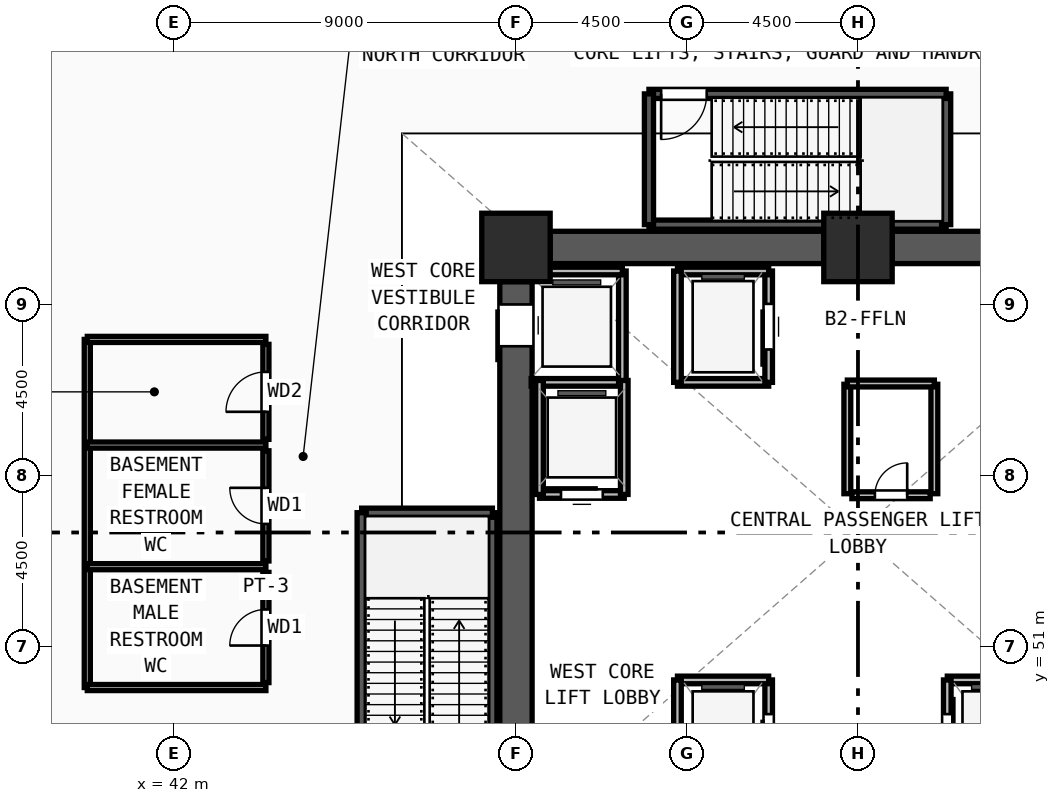
"""IFC4 building model, lengths in metres.
Left out: names, types, materials, properties, quantities, classifications, styles, units other than length and angle.
Written with IfcOpenShell. Run it as: python <this file> out.ifc"""

import sys

from ifc_helpers import new_model, si_unit, direction, frame, frame_2d, origin, origin_2d, place, context, subcontext, project, spatial, rectangle, extrude, source, transform, mapped, element, fill, save


model = new_model("IFC4")
c1 = context("Model", 3, precision=1e-05, world=origin(), true_north=direction((0.0, 1.0)))
c2 = subcontext(c1, "Body", "Model", "MODEL_VIEW")
j1 = project(units=[si_unit("LENGTHUNIT", "METRE"), si_unit("PLANEANGLEUNIT", "RADIAN")], contexts=[c1])
p1 = place(None, origin())
s1 = spatial("IfcSite", under=j1, at=p1, CompositionType="ELEMENT")
p2 = place(p1, origin())
s2 = spatial("IfcBuilding", under=s1, at=p2, CompositionType="ELEMENT")
p3 = place(p2, frame((0.0, 0.0, -9.6)))
s3 = spatial("IfcBuildingStorey", under=s2, at=p3, CompositionType="ELEMENT", Elevation=-9.6)
m1 = source(origin(), c2, "Body", "SweptSolid", [
    extrude(rectangle(XDim=1.8, YDim=1.8, at=origin_2d()), origin(), (0.0, 0.0, 1.0), 4.8),
])
for number, where, z_axis, x_axis in (
    (1, (60.0, 61.5, 0.0), (0.0, 0.0, 1.0), (1.0, 0.0, 0.0)),
    (2, (51.0, 61.5, 0.0), (0.0, 0.0, 1.0), (1.0, 0.0, 0.0)),
):
    element("IfcColumn", number, at=place(p3, frame(where, z_axis=z_axis, x_axis=x_axis)), inside=s3, PredefinedType="COLUMN", context=c2, shape_type="MappedRepresentation", body=[
        mapped(m1, transform((0.0, 0.0, 0.0), x_axis=(1.0, 0.0, 0.0), y_axis=(0.0, 1.0, 0.0), z_axis=(0.0, 0.0, 1.0), scale=1.0)),
    ])
for number, where, z_axis, x_axis in (
    (3, (51.9, 61.5, 0.0), (0.0, 0.0, 1.0), (1.0, 0.0, 0.0)),
    (4, (60.9, 61.5, 0.0), (0.0, 0.0, 1.0), (1.0, 0.0, 0.0)),
):
    element("IfcWall", number, at=place(p3, frame(where, z_axis=z_axis, x_axis=x_axis)), inside=s3, PredefinedType="SHEAR", context=c2, shape_type="SweptSolid", body=[
        extrude(rectangle(XDim=7.2, YDim=0.85, at=frame_2d((3.6, 0.0))), origin(), (0.0, 0.0, 1.0), 4.5),
    ])
p4 = place(p3, frame((51.0, 47.4, 0.0), z_axis=(0.0, 0.0, 1.0), x_axis=(0.0, 1.0, 0.0)))
e5 = element("IfcWall", 5, at=p4, inside=s3, PredefinedType="SHEAR", context=c2, shape_type="SweptSolid", body=[
    extrude(rectangle(XDim=13.2, YDim=0.85, at=frame_2d((6.6, 0.0))), origin(), (0.0, 0.0, 1.0), 4.5),
])
m2 = source(origin(), c2, "Body", "SweptSolid", [
    extrude(rectangle(XDim=1.1, YDim=2.2, at=frame_2d((0.55, 1.1))), frame((0.0, 0.435, 0.0), z_axis=(0.0, -1.0, 0.0), x_axis=(1.0, 0.0, 0.0)), (0.0, 0.0, 1.0), 0.87),
])
p5 = place(p4, frame((11.5, 0.0, 0.0)))
e6 = element("IfcOpeningElement", 6, at=p5, cuts=e5, PredefinedType="OPENING", context=c2, shape_type="MappedRepresentation", body=[
    mapped(m2, transform((0.0, 0.0, 0.0), x_axis=(1.0, 0.0, 0.0), y_axis=(0.0, 1.0, 0.0), z_axis=(0.0, 0.0, 1.0), scale=1.0)),
])
p6 = place(p3, frame((50.38, 46.7, 0.0), z_axis=(0.0, 0.0, 1.0), x_axis=(0.0, 1.0, 0.0)))
e7 = element("IfcWall", 7, at=p6, inside=s3, PredefinedType="SOLIDWALL", context=c2, shape_type="SweptSolid", body=[
    extrude(rectangle(XDim=7.82, YDim=0.24, at=frame_2d((3.91, 0.0))), origin(), (0.0, 0.0, 1.0), 4.5),
])
p7 = place(p3, frame((50.38, 54.52, 0.0), z_axis=(0.0, 0.0, 1.0), x_axis=(-1.0, 0.0, 0.0)))
e8 = element("IfcWall", 8, at=p7, inside=s3, PredefinedType="SOLIDWALL", context=c2, shape_type="SweptSolid", body=[
    extrude(rectangle(XDim=3.44, YDim=0.24, at=frame_2d((1.72, 0.0))), origin(), (0.0, 0.0, 1.0), 4.5),
])
p8 = place(p3, frame((46.94, 54.52, 0.0), z_axis=(0.0, 0.0, 1.0), x_axis=(0.0, -1.0, 0.0)))
e9 = element("IfcWall", 9, at=p8, inside=s3, PredefinedType="SOLIDWALL", context=c2, shape_type="SweptSolid", body=[
    extrude(rectangle(XDim=7.82, YDim=0.24, at=frame_2d((3.91, 0.0))), origin(), (0.0, 0.0, 1.0), 4.5),
])
m3 = source(origin(), c2, "Body", "SweptSolid", [
    extrude(rectangle(XDim=1.2, YDim=2.2, at=frame_2d((0.6, 1.1))), frame((0.0, 0.13, 0.0), z_axis=(0.0, -1.0, 0.0), x_axis=(1.0, 0.0, 0.0)), (0.0, 0.0, 1.0), 0.26),
])
p9 = place(p8, frame((6.3, 0.0, 0.0)))
e10 = element("IfcOpeningElement", 10, at=p9, cuts=e9, PredefinedType="OPENING", context=c2, shape_type="MappedRepresentation", body=[
    mapped(m3, transform((0.0, 0.0, 0.0), x_axis=(1.0, 0.0, 0.0), y_axis=(0.0, 1.0, 0.0), z_axis=(0.0, 0.0, 1.0), scale=1.0)),
])
p10 = place(p3, frame((54.5, 62.1, 0.0), z_axis=(0.0, 0.0, 1.0), x_axis=(1.0, 0.0, 0.0)))
e11 = element("IfcWall", 11, at=p10, inside=s3, PredefinedType="SOLIDWALL", context=c2, shape_type="SweptSolid", body=[
    extrude(rectangle(XDim=7.82, YDim=0.24, at=frame_2d((3.91, 0.0))), origin(), (0.0, 0.0, 1.0), 4.5),
])
p11 = place(p3, frame((62.32, 62.1, 0.0), z_axis=(0.0, 0.0, 1.0), x_axis=(0.0, 1.0, 0.0)))
e12 = element("IfcWall", 12, at=p11, inside=s3, PredefinedType="SOLIDWALL", context=c2, shape_type="SweptSolid", body=[
    extrude(rectangle(XDim=3.44, YDim=0.24, at=frame_2d((1.72, 0.0))), origin(), (0.0, 0.0, 1.0), 4.5),
])
p12 = place(p3, frame((62.32, 65.54, 0.0), z_axis=(0.0, 0.0, 1.0), x_axis=(-1.0, 0.0, 0.0)))
e13 = element("IfcWall", 13, at=p12, inside=s3, PredefinedType="SOLIDWALL", context=c2, shape_type="SweptSolid", body=[
    extrude(rectangle(XDim=7.82, YDim=0.24, at=frame_2d((3.91, 0.0))), origin(), (0.0, 0.0, 1.0), 4.5),
])
p13 = place(p12, frame((6.3, 0.0, 0.0)))
e14 = element("IfcOpeningElement", 14, at=p13, cuts=e13, PredefinedType="OPENING", context=c2, shape_type="MappedRepresentation", body=[
    mapped(m3, transform((0.0, 0.0, 0.0), x_axis=(1.0, 0.0, 0.0), y_axis=(0.0, 1.0, 0.0), z_axis=(0.0, 0.0, 1.0), scale=1.0)),
])
p14 = place(p3, frame((54.5, 65.54, 0.0), z_axis=(0.0, 0.0, 1.0), x_axis=(0.0, -1.0, 0.0)))
e15 = element("IfcWall", 15, at=p14, inside=s3, PredefinedType="SOLIDWALL", context=c2, shape_type="SweptSolid", body=[
    extrude(rectangle(XDim=3.44, YDim=0.24, at=frame_2d((1.72, 0.0))), origin(), (0.0, 0.0, 1.0), 4.5),
])
p15 = place(p3, frame((57.65, 47.12, 0.0), z_axis=(0.0, 0.0, 1.0), x_axis=(0.0, 1.0, 0.0)))
e16 = element("IfcWall", 16, at=p15, inside=s3, PredefinedType="SOLIDWALL", context=c2, shape_type="SweptSolid", body=[
    extrude(rectangle(XDim=3.0, YDim=0.2, at=frame_2d((1.5, 0.0))), origin(), (0.0, 0.0, 1.0), 4.5),
])
m4 = source(origin(), c2, "Body", "SweptSolid", [
    extrude(rectangle(XDim=1.2, YDim=2.3, at=frame_2d((0.6, 1.15))), frame((0.0, 0.11, 0.0), z_axis=(0.0, -1.0, 0.0), x_axis=(1.0, 0.0, 0.0)), (0.0, 0.0, 1.0), 0.22),
])
p16 = place(p15, frame((0.9, 0.0, 0.0)))
e17 = element("IfcOpeningElement", 17, at=p16, cuts=e16, PredefinedType="OPENING", context=c2, shape_type="MappedRepresentation", body=[
    mapped(m4, transform((0.0, 0.0, 0.0), x_axis=(1.0, 0.0, 0.0), y_axis=(0.0, 1.0, 0.0), z_axis=(0.0, 0.0, 1.0), scale=1.0)),
])
p17 = place(p3, frame((57.65, 50.12, 0.0), z_axis=(0.0, 0.0, 1.0), x_axis=(-1.0, 0.0, 0.0)))
e18 = element("IfcWall", 18, at=p17, inside=s3, PredefinedType="SOLIDWALL", context=c2, shape_type="SweptSolid", body=[
    extrude(rectangle(XDim=2.4, YDim=0.2, at=frame_2d((1.2, 0.0))), origin(), (0.0, 0.0, 1.0), 4.5),
])
p18 = place(p3, frame((55.25, 50.12, 0.0), z_axis=(0.0, 0.0, 1.0), x_axis=(0.0, -1.0, 0.0)))
e19 = element("IfcWall", 19, at=p18, inside=s3, PredefinedType="SOLIDWALL", context=c2, shape_type="SweptSolid", body=[
    extrude(rectangle(XDim=3.0, YDim=0.2, at=frame_2d((1.5, 0.0))), origin(), (0.0, 0.0, 1.0), 4.5),
])
p19 = place(p3, frame((64.75, 50.12, 0.0), z_axis=(0.0, 0.0, 1.0), x_axis=(-1.0, 0.0, 0.0)))
e20 = element("IfcWall", 20, at=p19, inside=s3, PredefinedType="SOLIDWALL", context=c2, shape_type="SweptSolid", body=[
    extrude(rectangle(XDim=2.4, YDim=0.2, at=frame_2d((1.2, 0.0))), origin(), (0.0, 0.0, 1.0), 4.5),
])
p20 = place(p3, frame((62.35, 50.12, 0.0), z_axis=(0.0, 0.0, 1.0), x_axis=(0.0, -1.0, 0.0)))
e21 = element("IfcWall", 21, at=p20, inside=s3, PredefinedType="SOLIDWALL", context=c2, shape_type="SweptSolid", body=[
    extrude(rectangle(XDim=3.0, YDim=0.2, at=frame_2d((1.5, 0.0))), origin(), (0.0, 0.0, 1.0), 4.5),
])
p21 = place(p20, frame((0.9, 0.0, 0.0)))
e22 = element("IfcOpeningElement", 22, at=p21, cuts=e21, PredefinedType="OPENING", context=c2, shape_type="MappedRepresentation", body=[
    mapped(m4, transform((0.0, 0.0, 0.0), x_axis=(1.0, 0.0, 0.0), y_axis=(0.0, 1.0, 0.0), z_axis=(0.0, 0.0, 1.0), scale=1.0)),
])
p22 = place(p3, frame((55.25, 57.95, 0.0), z_axis=(0.0, 0.0, 1.0), x_axis=(1.0, 0.0, 0.0)))
e23 = element("IfcWall", 23, at=p22, inside=s3, PredefinedType="SOLIDWALL", context=c2, shape_type="SweptSolid", body=[
    extrude(rectangle(XDim=2.4, YDim=0.2, at=frame_2d((1.2, 0.0))), origin(), (0.0, 0.0, 1.0), 4.5),
])
p23 = place(p3, frame((57.65, 57.95, 0.0), z_axis=(0.0, 0.0, 1.0), x_axis=(0.0, 1.0, 0.0)))
e24 = element("IfcWall", 24, at=p23, inside=s3, PredefinedType="SOLIDWALL", context=c2, shape_type="SweptSolid", body=[
    extrude(rectangle(XDim=2.93, YDim=0.2, at=frame_2d((1.465, 0.0))), origin(), (0.0, 0.0, 1.0), 4.5),
])
p24 = place(p23, frame((0.865, 0.0, 0.0)))
e25 = element("IfcOpeningElement", 25, at=p24, cuts=e24, PredefinedType="OPENING", context=c2, shape_type="MappedRepresentation", body=[
    mapped(m4, transform((0.0, 0.0, 0.0), x_axis=(1.0, 0.0, 0.0), y_axis=(0.0, 1.0, 0.0), z_axis=(0.0, 0.0, 1.0), scale=1.0)),
])
p25 = place(p3, frame((57.65, 60.88, 0.0), z_axis=(0.0, 0.0, 1.0), x_axis=(-1.0, 0.0, 0.0)))
e26 = element("IfcWall", 26, at=p25, inside=s3, PredefinedType="SOLIDWALL", context=c2, shape_type="SweptSolid", body=[
    extrude(rectangle(XDim=2.4, YDim=0.2, at=frame_2d((1.2, 0.0))), origin(), (0.0, 0.0, 1.0), 4.5),
])
p26 = place(p3, frame((55.25, 60.88, 0.0), z_axis=(0.0, 0.0, 1.0), x_axis=(0.0, -1.0, 0.0)))
e27 = element("IfcWall", 27, at=p26, inside=s3, PredefinedType="SOLIDWALL", context=c2, shape_type="SweptSolid", body=[
    extrude(rectangle(XDim=2.93, YDim=0.2, at=frame_2d((1.465, 0.0))), origin(), (0.0, 0.0, 1.0), 4.5),
])
p27 = place(p3, frame((51.4, 57.95, 0.0), z_axis=(0.0, 0.0, 1.0), x_axis=(1.0, 0.0, 0.0)))
e28 = element("IfcWall", 28, at=p27, inside=s3, PredefinedType="SOLIDWALL", context=c2, shape_type="SweptSolid", body=[
    extrude(rectangle(XDim=2.4, YDim=0.2, at=frame_2d((1.2, 0.0))), origin(), (0.0, 0.0, 1.0), 4.5),
])
p28 = place(p3, frame((53.8, 57.95, 0.0), z_axis=(0.0, 0.0, 1.0), x_axis=(0.0, 1.0, 0.0)))
e29 = element("IfcWall", 29, at=p28, inside=s3, PredefinedType="SOLIDWALL", context=c2, shape_type="SweptSolid", body=[
    extrude(rectangle(XDim=2.93, YDim=0.2, at=frame_2d((1.465, 0.0))), origin(), (0.0, 0.0, 1.0), 4.5),
])
p29 = place(p3, frame((53.8, 60.88, 0.0), z_axis=(0.0, 0.0, 1.0), x_axis=(-1.0, 0.0, 0.0)))
e30 = element("IfcWall", 30, at=p29, inside=s3, PredefinedType="SOLIDWALL", context=c2, shape_type="SweptSolid", body=[
    extrude(rectangle(XDim=2.4, YDim=0.2, at=frame_2d((1.2, 0.0))), origin(), (0.0, 0.0, 1.0), 4.5),
])
p30 = place(p3, frame((51.62, 55.0, 0.0), z_axis=(0.0, 0.0, 1.0), x_axis=(1.0, 0.0, 0.0)))
e31 = element("IfcWall", 31, at=p30, inside=s3, PredefinedType="SOLIDWALL", context=c2, shape_type="SweptSolid", body=[
    extrude(rectangle(XDim=2.23, YDim=0.2, at=frame_2d((1.115, 0.0))), origin(), (0.0, 0.0, 1.0), 4.5),
])
m5 = source(origin(), c2, "Body", "SweptSolid", [
    extrude(rectangle(XDim=1.1, YDim=2.2, at=frame_2d((0.55, 1.1))), frame((0.0, 0.11, 0.0), z_axis=(0.0, -1.0, 0.0), x_axis=(1.0, 0.0, 0.0)), (0.0, 0.0, 1.0), 0.22),
])
p31 = place(p30, frame((0.565, 0.0, 0.0)))
e32 = element("IfcOpeningElement", 32, at=p31, cuts=e31, PredefinedType="OPENING", context=c2, shape_type="MappedRepresentation", body=[
    mapped(m5, transform((0.0, 0.0, 0.0), x_axis=(1.0, 0.0, 0.0), y_axis=(0.0, 1.0, 0.0), z_axis=(0.0, 0.0, 1.0), scale=1.0)),
])
for number, where, z_axis, x_axis in (
    (33, (53.85, 55.0, 0.0), (0.0, 0.0, 1.0), (0.0, 1.0, 0.0)),
    (34, (51.62, 58.0, 0.0), (0.0, 0.0, 1.0), (0.0, -1.0, 0.0)),
):
    element("IfcWall", number, at=place(p3, frame(where, z_axis=z_axis, x_axis=x_axis)), inside=s3, PredefinedType="SOLIDWALL", context=c2, shape_type="SweptSolid", body=[
        extrude(rectangle(XDim=3.0, YDim=0.2, at=frame_2d((1.5, 0.0))), origin(), (0.0, 0.0, 1.0), 4.5),
    ])
p32 = place(p3, frame((59.84, 54.98, 0.0), z_axis=(0.0, 0.0, 1.0), x_axis=(1.0, 0.0, 0.0)))
e35 = element("IfcWall", 35, at=p32, inside=s3, PredefinedType="PARTITIONING", context=c2, shape_type="SweptSolid", body=[
    extrude(rectangle(XDim=2.06, YDim=0.18, at=frame_2d((1.03, 0.0))), origin(), (0.0, 0.0, 1.0), 4.5),
])
m6 = source(origin(), c2, "Body", "SweptSolid", [
    extrude(rectangle(XDim=0.85, YDim=2.1, at=frame_2d((0.425, 1.05))), frame((0.0, 0.1, 0.0), z_axis=(0.0, -1.0, 0.0), x_axis=(1.0, 0.0, 0.0)), (0.0, 0.0, 1.0), 0.2),
])
p33 = place(p32, frame((0.605, 0.0, 0.0)))
e36 = element("IfcOpeningElement", 36, at=p33, cuts=e35, PredefinedType="OPENING", context=c2, shape_type="MappedRepresentation", body=[
    mapped(m6, transform((0.0, 0.0, 0.0), x_axis=(1.0, 0.0, 0.0), y_axis=(0.0, 1.0, 0.0), z_axis=(0.0, 0.0, 1.0), scale=1.0)),
])
p34 = place(p3, frame((44.42, 50.05, 0.0), z_axis=(0.0, 0.0, 1.0), x_axis=(0.0, 1.0, 0.0)))
e37 = element("IfcWall", 37, at=p34, inside=s3, PredefinedType="PARTITIONING", context=c2, shape_type="SweptSolid", body=[
    extrude(rectangle(XDim=2.9, YDim=0.16, at=frame_2d((1.45, 0.0))), origin(), (0.0, 0.0, 1.0), 4.5),
])
m7 = source(origin(), c2, "Body", "SweptSolid", [
    extrude(rectangle(XDim=0.95, YDim=2.15, at=frame_2d((0.475, 1.075))), frame((0.0, 0.09, 0.0), z_axis=(0.0, -1.0, 0.0), x_axis=(1.0, 0.0, 0.0)), (0.0, 0.0, 1.0), 0.18),
])
p35 = place(p34, frame((0.975, 0.0, 0.0)))
e38 = element("IfcOpeningElement", 38, at=p35, cuts=e37, PredefinedType="OPENING", context=c2, shape_type="MappedRepresentation", body=[
    mapped(m7, transform((0.0, 0.0, 0.0), x_axis=(1.0, 0.0, 0.0), y_axis=(0.0, 1.0, 0.0), z_axis=(0.0, 0.0, 1.0), scale=1.0)),
])
p36 = place(p3, frame((44.42, 53.25, 0.0), z_axis=(0.0, 0.0, 1.0), x_axis=(0.0, 1.0, 0.0)))
e39 = element("IfcWall", 39, at=p36, inside=s3, PredefinedType="PARTITIONING", context=c2, shape_type="SweptSolid", body=[
    extrude(rectangle(XDim=2.9, YDim=0.16, at=frame_2d((1.45, 0.0))), origin(), (0.0, 0.0, 1.0), 4.5),
])
p37 = place(p36, frame((0.975, 0.0, 0.0)))
e40 = element("IfcOpeningElement", 40, at=p37, cuts=e39, PredefinedType="OPENING", context=c2, shape_type="MappedRepresentation", body=[
    mapped(m7, transform((0.0, 0.0, 0.0), x_axis=(1.0, 0.0, 0.0), y_axis=(0.0, 1.0, 0.0), z_axis=(0.0, 0.0, 1.0), scale=1.0)),
])
p38 = place(p3, frame((44.42, 56.45, 0.0), z_axis=(0.0, 0.0, 1.0), x_axis=(0.0, 1.0, 0.0)))
e41 = element("IfcWall", 41, at=p38, inside=s3, PredefinedType="PARTITIONING", context=c2, shape_type="SweptSolid", body=[
    extrude(rectangle(XDim=2.5, YDim=0.16, at=frame_2d((1.25, 0.0))), origin(), (0.0, 0.0, 1.0), 4.5),
])
m8 = source(origin(), c2, "Body", "SweptSolid", [
    extrude(rectangle(XDim=1.05, YDim=2.15, at=frame_2d((0.525, 1.075))), frame((0.0, 0.09, 0.0), z_axis=(0.0, -1.0, 0.0), x_axis=(1.0, 0.0, 0.0)), (0.0, 0.0, 1.0), 0.18),
])
p39 = place(p38, frame((0.725, 0.0, 0.0)))
e42 = element("IfcOpeningElement", 42, at=p39, cuts=e41, PredefinedType="OPENING", context=c2, shape_type="MappedRepresentation", body=[
    mapped(m8, transform((0.0, 0.0, 0.0), x_axis=(1.0, 0.0, 0.0), y_axis=(0.0, 1.0, 0.0), z_axis=(0.0, 0.0, 1.0), scale=1.0)),
])
for number, where, z_axis, x_axis in (
    (43, (59.72, 55.02, 0.0), (0.0, 0.0, 1.0), (0.0, 1.0, 0.0)),
    (44, (62.01, 55.02, 0.0), (0.0, 0.0, 1.0), (0.0, 1.0, 0.0)),
):
    element("IfcWall", number, at=place(p3, frame(where, z_axis=z_axis, x_axis=x_axis)), inside=s3, PredefinedType="PARTITIONING", context=c2, shape_type="SweptSolid", body=[
        extrude(rectangle(XDim=2.88, YDim=0.18, at=frame_2d((1.44, 0.0))), origin(), (0.0, 0.0, 1.0), 4.5),
    ])
p40 = place(p3, frame((59.72, 57.92, 0.0), z_axis=(0.0, 0.0, 1.0), x_axis=(1.0, 0.0, 0.0)))
e45 = element("IfcWall", 45, at=p40, inside=s3, PredefinedType="PARTITIONING", context=c2, shape_type="SweptSolid", body=[
    extrude(rectangle(XDim=2.29, YDim=0.18, at=frame_2d((1.145, 0.0))), origin(), (0.0, 0.0, 1.0), 4.5),
])
p41 = place(p3, frame((39.72, 49.92, 0.0), z_axis=(0.0, 0.0, 1.0), x_axis=(0.0, 1.0, 0.0)))
e46 = element("IfcWall", 46, at=p41, inside=s3, PredefinedType="PARTITIONING", context=c2, shape_type="SweptSolid", body=[
    extrude(rectangle(XDim=9.16, YDim=0.16, at=frame_2d((4.58, 0.0))), origin(), (0.0, 0.0, 1.0), 4.5),
])
for number, where, z_axis, x_axis in (
    (47, (39.72, 49.92, 0.0), (0.0, 0.0, 1.0), (1.0, 0.0, 0.0)),
    (48, (39.72, 53.1, 0.0), (0.0, 0.0, 1.0), (1.0, 0.0, 0.0)),
    (49, (39.72, 56.3, 0.0), (0.0, 0.0, 1.0), (1.0, 0.0, 0.0)),
    (50, (39.72, 59.08, 0.0), (0.0, 0.0, 1.0), (1.0, 0.0, 0.0)),
):
    element("IfcWall", number, at=place(p3, frame(where, z_axis=z_axis, x_axis=x_axis)), inside=s3, PredefinedType="PARTITIONING", context=c2, shape_type="SweptSolid", body=[
        extrude(rectangle(XDim=4.7, YDim=0.16, at=frame_2d((2.35, 0.0))), origin(), (0.0, 0.0, 1.0), 4.5),
    ])
m9 = source(origin(), c2, "Body", "SweptSolid", [
    extrude(rectangle(XDim=1.2, YDim=2.2, at=frame_2d((0.6, 1.1))), frame((0.0, 0.025, 0.0), z_axis=(0.0, -1.0, 0.0), x_axis=(1.0, 0.0, 0.0)), (0.0, 0.0, 1.0), 0.05),
])
p42 = place(p13, origin())
e51 = element("IfcDoor", 51, at=p42, inside=s3, OperationType="SINGLE_SWING_RIGHT", PredefinedType="DOOR", context=c2, shape_type="MappedRepresentation", body=[
    mapped(m9, transform((0.0, 0.0, 0.0), x_axis=(1.0, 0.0, 0.0), y_axis=(0.0, 1.0, 0.0), z_axis=(0.0, 0.0, 1.0), scale=1.0)),
])
fill(e14, e51)
m10 = source(origin(), c2, "Body", "SweptSolid", [
    extrude(rectangle(XDim=1.2, YDim=2.3, at=frame_2d((0.6, 1.15))), frame((0.0, 0.025, 0.0), z_axis=(0.0, -1.0, 0.0), x_axis=(1.0, 0.0, 0.0)), (0.0, 0.0, 1.0), 0.05),
])
p43 = place(p16, origin())
e52 = element("IfcDoor", 52, at=p43, inside=s3, OperationType="SLIDING_TO_LEFT", PredefinedType="DOOR", context=c2, shape_type="MappedRepresentation", body=[
    mapped(m10, transform((0.0, 0.0, 0.0), x_axis=(1.0, 0.0, 0.0), y_axis=(0.0, 1.0, 0.0), z_axis=(0.0, 0.0, 1.0), scale=1.0)),
])
fill(e17, e52)
p44 = place(p21, origin())
e53 = element("IfcDoor", 53, at=p44, inside=s3, OperationType="SLIDING_TO_LEFT", PredefinedType="DOOR", context=c2, shape_type="MappedRepresentation", body=[
    mapped(m10, transform((0.0, 0.0, 0.0), x_axis=(1.0, 0.0, 0.0), y_axis=(0.0, 1.0, 0.0), z_axis=(0.0, 0.0, 1.0), scale=1.0)),
])
fill(e22, e53)
p45 = place(p24, origin())
e54 = element("IfcDoor", 54, at=p45, inside=s3, OperationType="SLIDING_TO_LEFT", PredefinedType="DOOR", context=c2, shape_type="MappedRepresentation", body=[
    mapped(m10, transform((0.0, 0.0, 0.0), x_axis=(1.0, 0.0, 0.0), y_axis=(0.0, 1.0, 0.0), z_axis=(0.0, 0.0, 1.0), scale=1.0)),
])
fill(e25, e54)
m11 = source(origin(), c2, "Body", "SweptSolid", [
    extrude(rectangle(XDim=1.1, YDim=2.2, at=frame_2d((0.55, 1.1))), frame((0.0, 0.025, 0.0), z_axis=(0.0, -1.0, 0.0), x_axis=(1.0, 0.0, 0.0)), (0.0, 0.0, 1.0), 0.05),
])
p46 = place(p5, origin())
e55 = element("IfcDoor", 55, at=p46, inside=s3, OperationType="SLIDING_TO_LEFT", PredefinedType="DOOR", context=c2, shape_type="MappedRepresentation", body=[
    mapped(m11, transform((0.0, 0.0, 0.0), x_axis=(1.0, 0.0, 0.0), y_axis=(0.0, 1.0, 0.0), z_axis=(0.0, 0.0, 1.0), scale=1.0)),
])
fill(e6, e55)
p47 = place(p31, origin())
e56 = element("IfcDoor", 56, at=p47, inside=s3, OperationType="SLIDING_TO_LEFT", PredefinedType="DOOR", context=c2, shape_type="MappedRepresentation", body=[
    mapped(m11, transform((0.0, 0.0, 0.0), x_axis=(1.0, 0.0, 0.0), y_axis=(0.0, 1.0, 0.0), z_axis=(0.0, 0.0, 1.0), scale=1.0)),
])
fill(e32, e56)
m12 = source(origin(), c2, "Body", "SweptSolid", [
    extrude(rectangle(XDim=0.85, YDim=2.1, at=frame_2d((0.425, 1.05))), frame((0.0, 0.025, 0.0), z_axis=(0.0, -1.0, 0.0), x_axis=(1.0, 0.0, 0.0)), (0.0, 0.0, 1.0), 0.05),
])
p48 = place(p33, origin())
e57 = element("IfcDoor", 57, at=p48, inside=s3, OperationType="SINGLE_SWING_RIGHT", PredefinedType="DOOR", context=c2, shape_type="MappedRepresentation", body=[
    mapped(m12, transform((0.0, 0.0, 0.0), x_axis=(1.0, 0.0, 0.0), y_axis=(0.0, 1.0, 0.0), z_axis=(0.0, 0.0, 1.0), scale=1.0)),
])
fill(e36, e57)
m13 = source(origin(), c2, "Body", "SweptSolid", [
    extrude(rectangle(XDim=0.95, YDim=2.15, at=frame_2d((0.475, 1.075))), frame((0.0, 0.025, 0.0), z_axis=(0.0, -1.0, 0.0), x_axis=(1.0, 0.0, 0.0)), (0.0, 0.0, 1.0), 0.05),
])
p49 = place(p35, origin())
e58 = element("IfcDoor", 58, at=p49, inside=s3, OperationType="SINGLE_SWING_LEFT", PredefinedType="DOOR", context=c2, shape_type="MappedRepresentation", body=[
    mapped(m13, transform((0.0, 0.0, 0.0), x_axis=(1.0, 0.0, 0.0), y_axis=(0.0, 1.0, 0.0), z_axis=(0.0, 0.0, 1.0), scale=1.0)),
])
fill(e38, e58)
p50 = place(p37, origin())
e59 = element("IfcDoor", 59, at=p50, inside=s3, OperationType="SINGLE_SWING_RIGHT", PredefinedType="DOOR", context=c2, shape_type="MappedRepresentation", body=[
    mapped(m13, transform((0.0, 0.0, 0.0), x_axis=(1.0, 0.0, 0.0), y_axis=(0.0, 1.0, 0.0), z_axis=(0.0, 0.0, 1.0), scale=1.0)),
])
fill(e40, e59)
m14 = source(origin(), c2, "Body", "SweptSolid", [
    extrude(rectangle(XDim=1.05, YDim=2.15, at=frame_2d((0.525, 1.075))), frame((0.0, 0.025, 0.0), z_axis=(0.0, -1.0, 0.0), x_axis=(1.0, 0.0, 0.0)), (0.0, 0.0, 1.0), 0.05),
])
p51 = place(p39, origin())
e60 = element("IfcDoor", 60, at=p51, inside=s3, OperationType="SINGLE_SWING_LEFT", PredefinedType="DOOR", context=c2, shape_type="MappedRepresentation", body=[
    mapped(m14, transform((0.0, 0.0, 0.0), x_axis=(1.0, 0.0, 0.0), y_axis=(0.0, 1.0, 0.0), z_axis=(0.0, 0.0, 1.0), scale=1.0)),
])
fill(e42, e60)
save(model, sys.argv[1])
